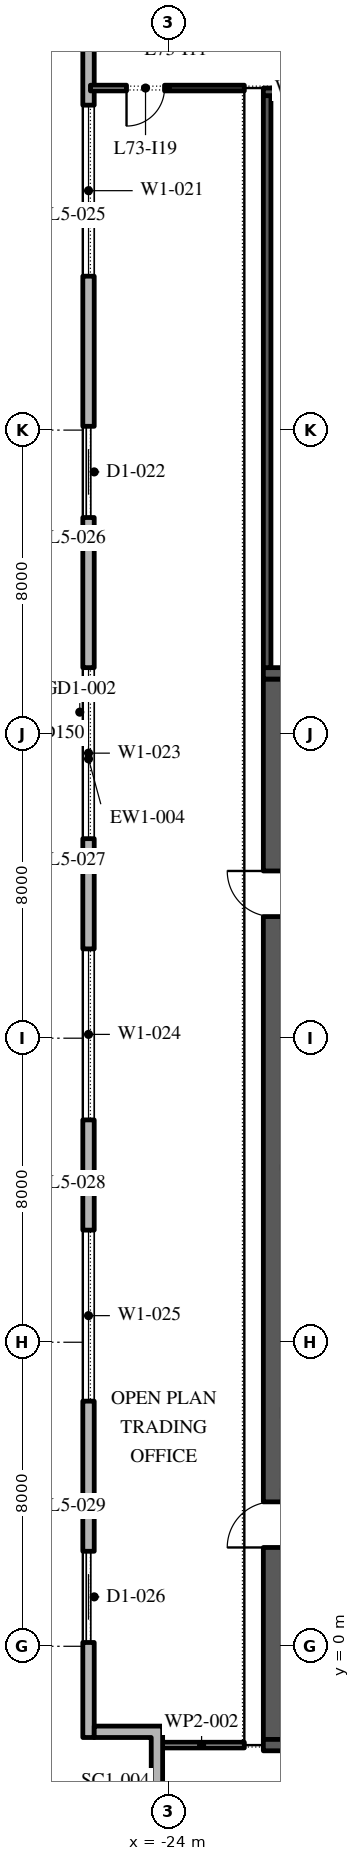
"""IFC4 building model, lengths in metres.
Left out: names, types, materials, properties, quantities, classifications, styles, units other than length and angle.
Written with IfcOpenShell. Run it as: python <this file> out.ifc"""

import sys

from ifc_helpers import new_model, si_unit, direction, frame, frame_2d, origin, place, context, subcontext, project, spatial, polyline, rectangle, outline, extrude, element, fill, save


model = new_model("IFC4")
c1 = context("Model", 3, precision=1e-05, world=origin(), true_north=direction((0.0, 1.0)))
c2 = subcontext(c1, "Body", "Model", "MODEL_VIEW")
j1 = project(units=[si_unit("LENGTHUNIT", "METRE"), si_unit("PLANEANGLEUNIT", "RADIAN")], contexts=[c1])
p1 = place(None, origin())
s1 = spatial("IfcSite", under=j1, at=p1, CompositionType="ELEMENT")
p2 = place(p1, origin())
s2 = spatial("IfcBuilding", under=s1, at=p2, CompositionType="ELEMENT")
p3 = place(p2, frame((0.0, 0.0, 334.2)))
s3 = spatial("IfcBuildingStorey", under=s2, at=p3, CompositionType="ELEMENT", Elevation=334.2)
p4 = place(p3, frame((-26.1, 49.1, 0.0), z_axis=(0.0, 0.0, 1.0), x_axis=(0.0, -1.0, 0.0)))
e1 = element("IfcWall", 1, at=p4, inside=s3, PredefinedType="STANDARD", context=c2, shape_type="SweptSolid", body=[
    extrude(rectangle(XDim=51.5, YDim=0.3, at=frame_2d((25.75, 0.0))), origin(), (0.0, 0.0, 1.0), 4.0),
])
p5 = place(p4, frame((1.3, 0.0, 0.45)))
e2 = element("IfcOpeningElement", 2, at=p5, cuts=e1, PredefinedType="OPENING", context=c2, shape_type="SweptSolid", body=[
    extrude(rectangle(XDim=4.5, YDim=3.05, at=frame_2d((2.25, 1.525))), frame((0.0, 0.16, 0.0), z_axis=(0.0, -1.0, 0.0), x_axis=(1.0, 0.0, 0.0)), (0.0, 0.0, 1.0), 0.32),
])
p6 = place(p4, frame((8.55, 0.0, 0.45)))
e3 = element("IfcOpeningElement", 3, at=p6, cuts=e1, PredefinedType="OPENING", context=c2, shape_type="SweptSolid", body=[
    extrude(rectangle(XDim=4.5, YDim=3.05, at=frame_2d((2.25, 1.525))), frame((0.0, 0.16, 0.0), z_axis=(0.0, -1.0, 0.0), x_axis=(1.0, 0.0, 0.0)), (0.0, 0.0, 1.0), 0.32),
])
p7 = place(p4, frame((17.0, 0.0, 0.0)))
e4 = element("IfcOpeningElement", 4, at=p7, cuts=e1, PredefinedType="OPENING", context=c2, shape_type="SweptSolid", body=[
    extrude(rectangle(XDim=2.4, YDim=3.5, at=frame_2d((1.2, 1.75))), frame((0.0, 0.16, 0.0), z_axis=(0.0, -1.0, 0.0), x_axis=(1.0, 0.0, 0.0)), (0.0, 0.0, 1.0), 0.32),
])
p8 = place(p4, frame((23.35, 0.0, 0.45)))
e5 = element("IfcOpeningElement", 5, at=p8, cuts=e1, PredefinedType="OPENING", context=c2, shape_type="SweptSolid", body=[
    extrude(rectangle(XDim=4.5, YDim=3.05, at=frame_2d((2.25, 1.525))), frame((0.0, 0.16, 0.0), z_axis=(0.0, -1.0, 0.0), x_axis=(1.0, 0.0, 0.0)), (0.0, 0.0, 1.0), 0.32),
])
p9 = place(p4, frame((30.75, 0.0, 0.45)))
e6 = element("IfcOpeningElement", 6, at=p9, cuts=e1, PredefinedType="OPENING", context=c2, shape_type="SweptSolid", body=[
    extrude(rectangle(XDim=4.5, YDim=3.05, at=frame_2d((2.25, 1.525))), frame((0.0, 0.16, 0.0), z_axis=(0.0, -1.0, 0.0), x_axis=(1.0, 0.0, 0.0)), (0.0, 0.0, 1.0), 0.32),
])
p10 = place(p4, frame((38.15, 0.0, 0.45)))
e7 = element("IfcOpeningElement", 7, at=p10, cuts=e1, PredefinedType="OPENING", context=c2, shape_type="SweptSolid", body=[
    extrude(rectangle(XDim=4.5, YDim=3.05, at=frame_2d((2.25, 1.525))), frame((0.0, 0.16, 0.0), z_axis=(0.0, -1.0, 0.0), x_axis=(1.0, 0.0, 0.0)), (0.0, 0.0, 1.0), 0.32),
])
p11 = place(p4, frame((46.6, 0.0, 0.0)))
e8 = element("IfcOpeningElement", 8, at=p11, cuts=e1, PredefinedType="OPENING", context=c2, shape_type="SweptSolid", body=[
    extrude(rectangle(XDim=2.4, YDim=3.5, at=frame_2d((1.2, 1.75))), frame((0.0, 0.16, 0.0), z_axis=(0.0, -1.0, 0.0), x_axis=(1.0, 0.0, 0.0)), (0.0, 0.0, 1.0), 0.32),
])
p12 = place(p3, origin())
e9 = element("IfcWall", 9, at=p12, inside=s3, PredefinedType="STANDARD", context=c2, shape_type="SweptSolid", body=[
    extrude(outline(polyline([(-22.65, -4.2), (-24.45, -4.2), (-24.45, -2.4), (-25.95, -2.4), (-25.95, -2.1), (-24.15, -2.1), (-24.15, -3.9), (-22.35, -3.9), (-22.35, -6.0), (-22.65, -6.0), (-22.65, -4.2)])), origin(), (0.0, 0.0, 1.0), 4.0),
])
p13 = place(p3, frame((-21.25, -2.45, 0.0), z_axis=(0.0, 0.0, 1.0), x_axis=(0.0, 1.0, 0.0)))
e10 = element("IfcWall", 10, at=p13, inside=s3, PredefinedType="SHEAR", context=c2, shape_type="SweptSolid", body=[
    extrude(rectangle(XDim=27.9, YDim=0.5, at=frame_2d((13.95, 0.0))), origin(), (0.0, 0.0, 1.0), 4.0),
])
p14 = place(p13, frame((5.05, 0.0, 0.0)))
e11 = element("IfcOpeningElement", 11, at=p14, cuts=e10, PredefinedType="OPENING", context=c2, shape_type="SweptSolid", body=[
    extrude(rectangle(XDim=1.2, YDim=2.1, at=frame_2d((0.6, 1.05))), frame((0.0, 0.26, 0.0), z_axis=(0.0, -1.0, 0.0), x_axis=(1.0, 0.0, 0.0)), (0.0, 0.0, 1.0), 0.52),
])
p15 = place(p13, frame((21.65, 0.0, 0.0)))
e12 = element("IfcOpeningElement", 12, at=p15, cuts=e10, PredefinedType="OPENING", context=c2, shape_type="SweptSolid", body=[
    extrude(rectangle(XDim=1.2, YDim=2.1, at=frame_2d((0.6, 1.05))), frame((0.0, 0.26, 0.0), z_axis=(0.0, -1.0, 0.0), x_axis=(1.0, 0.0, 0.0)), (0.0, 0.0, 1.0), 0.52),
])
for number, where, z_axis, x_axis in (
    (13, (-21.5, -2.6, 0.0), (0.0, 0.0, 1.0), (1.0, 0.0, 0.0)),
    (14, (-21.5, 25.6, 0.0), (0.0, 0.0, 1.0), (1.0, 0.0, 0.0)),
):
    element("IfcWall", number, at=place(p3, frame(where, z_axis=z_axis, x_axis=x_axis)), inside=s3, PredefinedType="SHEAR", context=c2, shape_type="SweptSolid", body=[
        extrude(rectangle(XDim=11.0, YDim=0.3, at=frame_2d((5.5, 0.0))), origin(), (0.0, 0.0, 1.0), 4.0),
    ])
p16 = place(p3, frame((-21.4, 25.75, 0.0), z_axis=(0.0, 0.0, 1.0), x_axis=(0.0, 1.0, 0.0)))
e15 = element("IfcWall", 15, at=p16, inside=s3, PredefinedType="SHEAR", context=c2, shape_type="SweptSolid", body=[
    extrude(rectangle(XDim=15.05, YDim=0.2, at=frame_2d((7.525, 0.0))), origin(), (0.0, 0.0, 1.0), 4.0),
])
p17 = place(p3, frame((-21.5, 40.9, 0.0), z_axis=(0.0, 0.0, 1.0), x_axis=(1.0, 0.0, 0.0)))
e16 = element("IfcWall", 16, at=p17, inside=s3, PredefinedType="SHEAR", context=c2, shape_type="SweptSolid", body=[
    extrude(rectangle(XDim=11.0, YDim=0.2, at=frame_2d((5.5, 0.0))), origin(), (0.0, 0.0, 1.0), 4.0),
])
p18 = place(p3, frame((-24.25, -2.6, 0.0), z_axis=(0.0, 0.0, 1.0), x_axis=(1.0, 0.0, 0.0)))
e17 = element("IfcWall", 17, at=p18, inside=s3, PredefinedType="PARTITIONING", context=c2, shape_type="SweptSolid", body=[
    extrude(rectangle(XDim=2.25, YDim=0.15, at=frame_2d((1.125, 0.0))), origin(), (0.0, 0.0, 1.0), 4.0),
])
p19 = place(p3, frame((-22.0, 41.0, 0.0), z_axis=(0.0, 0.0, 1.0), x_axis=(-1.0, 0.0, 0.0)))
e18 = element("IfcWall", 18, at=p19, inside=s3, PredefinedType="PARTITIONING", context=c2, shape_type="SweptSolid", body=[
    extrude(rectangle(XDim=4.05, YDim=0.15, at=frame_2d((2.025, 0.0))), origin(), (0.0, 0.0, 1.0), 4.0),
])
p20 = place(p19, frame((2.1, 0.0, 0.0)))
e19 = element("IfcOpeningElement", 19, at=p20, cuts=e18, PredefinedType="OPENING", context=c2, shape_type="SweptSolid", body=[
    extrude(rectangle(XDim=1.0, YDim=2.1, at=frame_2d((0.5, 1.05))), frame((0.0, 0.085, 0.0), z_axis=(0.0, -1.0, 0.0), x_axis=(1.0, 0.0, 0.0)), (0.0, 0.0, 1.0), 0.17),
])
p21 = place(p6, origin())
e20 = element("IfcWindow", 20, at=p21, inside=s3, PartitioningType="DOUBLE_PANEL_VERTICAL", PredefinedType="WINDOW", context=c2, shape_type="SweptSolid", body=[
    extrude(rectangle(XDim=4.5, YDim=3.05, at=frame_2d((2.25, 1.525))), frame((0.0, 0.03, 0.0), z_axis=(0.0, -1.0, 0.0), x_axis=(1.0, 0.0, 0.0)), (0.0, 0.0, 1.0), 0.06),
])
fill(e3, e20)
p22 = place(p7, origin())
e21 = element("IfcDoor", 21, at=p22, inside=s3, OperationType="DOUBLE_DOOR_SLIDING", PredefinedType="DOOR", context=c2, shape_type="SweptSolid", body=[
    extrude(rectangle(XDim=2.4, YDim=3.5, at=frame_2d((1.2, 1.75))), frame((0.0, 0.025, 0.0), z_axis=(0.0, -1.0, 0.0), x_axis=(1.0, 0.0, 0.0)), (0.0, 0.0, 1.0), 0.05),
])
fill(e4, e21)
p23 = place(p8, origin())
e22 = element("IfcWindow", 22, at=p23, inside=s3, PartitioningType="DOUBLE_PANEL_VERTICAL", PredefinedType="WINDOW", context=c2, shape_type="SweptSolid", body=[
    extrude(rectangle(XDim=4.5, YDim=3.05, at=frame_2d((2.25, 1.525))), frame((0.0, 0.03, 0.0), z_axis=(0.0, -1.0, 0.0), x_axis=(1.0, 0.0, 0.0)), (0.0, 0.0, 1.0), 0.06),
])
fill(e5, e22)
p24 = place(p9, origin())
e23 = element("IfcWindow", 23, at=p24, inside=s3, PartitioningType="DOUBLE_PANEL_VERTICAL", PredefinedType="WINDOW", context=c2, shape_type="SweptSolid", body=[
    extrude(rectangle(XDim=4.5, YDim=3.05, at=frame_2d((2.25, 1.525))), frame((0.0, 0.03, 0.0), z_axis=(0.0, -1.0, 0.0), x_axis=(1.0, 0.0, 0.0)), (0.0, 0.0, 1.0), 0.06),
])
fill(e6, e23)
p25 = place(p10, origin())
e24 = element("IfcWindow", 24, at=p25, inside=s3, PartitioningType="DOUBLE_PANEL_VERTICAL", PredefinedType="WINDOW", context=c2, shape_type="SweptSolid", body=[
    extrude(rectangle(XDim=4.5, YDim=3.05, at=frame_2d((2.25, 1.525))), frame((0.0, 0.03, 0.0), z_axis=(0.0, -1.0, 0.0), x_axis=(1.0, 0.0, 0.0)), (0.0, 0.0, 1.0), 0.06),
])
fill(e7, e24)
p26 = place(p11, origin())
e25 = element("IfcDoor", 25, at=p26, inside=s3, OperationType="DOUBLE_DOOR_SLIDING", PredefinedType="DOOR", context=c2, shape_type="SweptSolid", body=[
    extrude(rectangle(XDim=2.4, YDim=3.5, at=frame_2d((1.2, 1.75))), frame((0.0, 0.025, 0.0), z_axis=(0.0, -1.0, 0.0), x_axis=(1.0, 0.0, 0.0)), (0.0, 0.0, 1.0), 0.05),
])
fill(e8, e25)
p27 = place(p14, origin())
e26 = element("IfcDoor", 26, at=p27, inside=s3, OperationType="SINGLE_SWING_RIGHT", PredefinedType="DOOR", context=c2, shape_type="SweptSolid", body=[
    extrude(rectangle(XDim=1.2, YDim=2.1, at=frame_2d((0.6, 1.05))), frame((0.0, 0.025, 0.0), z_axis=(0.0, -1.0, 0.0), x_axis=(1.0, 0.0, 0.0)), (0.0, 0.0, 1.0), 0.05),
])
fill(e11, e26)
p28 = place(p15, origin())
e27 = element("IfcDoor", 27, at=p28, inside=s3, OperationType="SINGLE_SWING_LEFT", PredefinedType="DOOR", context=c2, shape_type="SweptSolid", body=[
    extrude(rectangle(XDim=1.2, YDim=2.1, at=frame_2d((0.6, 1.05))), frame((0.0, 0.025, 0.0), z_axis=(0.0, -1.0, 0.0), x_axis=(1.0, 0.0, 0.0)), (0.0, 0.0, 1.0), 0.05),
])
fill(e12, e27)
p29 = place(p20, origin())
e28 = element("IfcDoor", 28, at=p29, inside=s3, OperationType="SINGLE_SWING_LEFT", PredefinedType="DOOR", context=c2, shape_type="SweptSolid", body=[
    extrude(rectangle(XDim=1.0, YDim=2.1, at=frame_2d((0.5, 1.05))), frame((0.0, 0.025, 0.0), z_axis=(0.0, -1.0, 0.0), x_axis=(1.0, 0.0, 0.0)), (0.0, 0.0, 1.0), 0.05),
])
fill(e19, e28)
save(model, sys.argv[1])
